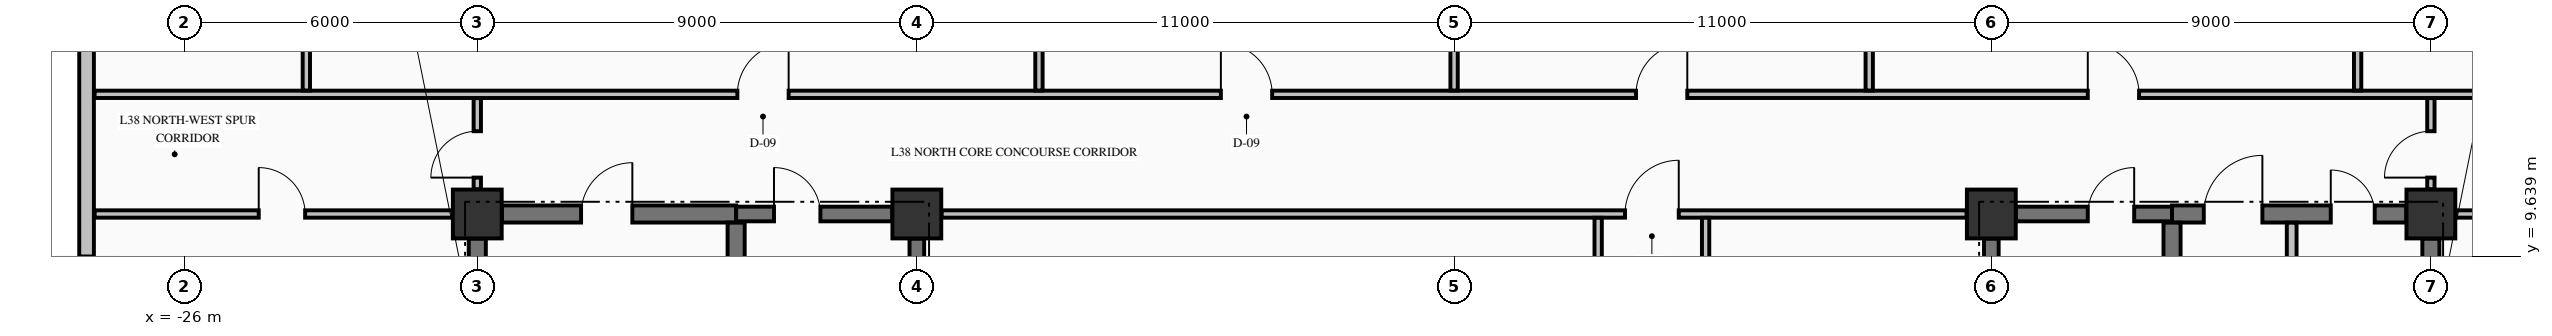
"""IFC4 building model, lengths in metres.
Left out: names, types, materials, properties, quantities, classifications, styles, units other than length and angle.
Written with IfcOpenShell. Run it as: python <this file> out.ifc"""

import sys

from ifc_helpers import new_model, si_unit, direction, frame, frame_2d, origin, origin_2d, place, context, subcontext, project, spatial, rectangle, extrude, element, fill, save


model = new_model("IFC4")
c1 = context("Model", 3, precision=1e-05, world=origin(), true_north=direction((0.0, 1.0)))
c2 = subcontext(c1, "Body", "Model", "MODEL_VIEW")
j1 = project(units=[si_unit("LENGTHUNIT", "METRE"), si_unit("PLANEANGLEUNIT", "RADIAN")], contexts=[c1])
p1 = place(None, origin())
s1 = spatial("IfcSite", under=j1, at=p1, CompositionType="ELEMENT")
p2 = place(p1, origin())
s2 = spatial("IfcBuilding", under=s1, at=p2, CompositionType="ELEMENT")
p3 = place(p2, frame((0.0, 0.0, 149.91)))
s3 = spatial("IfcBuildingStorey", under=s2, at=p3, CompositionType="ELEMENT", Elevation=149.91)
for number, where, z_axis, x_axis in (
    (1, (-20.0, 10.5, -0.25), (0.0, 0.0, 1.0), (1.0, 0.0, 0.0)),
    (2, (-11.0, 10.5, -0.25), (0.0, 0.0, 1.0), (1.0, 0.0, 0.0)),
    (3, (11.0, 10.5, -0.25), (0.0, 0.0, 1.0), (1.0, 0.0, 0.0)),
    (4, (20.0, 10.5, -0.25), (0.0, 0.0, 1.0), (1.0, 0.0, 0.0)),
):
    element("IfcColumn", number, at=place(p3, frame(where, z_axis=z_axis, x_axis=x_axis)), inside=s3, PredefinedType="COLUMN", context=c2, shape_type="SweptSolid", body=[
        extrude(rectangle(XDim=1.0, YDim=1.0, at=origin_2d()), origin(), (0.0, 0.0, 1.0), 3.395),
    ])
p4 = place(p3, frame((-28.0, 20.37, 0.0), z_axis=(0.0, 0.0, 1.0), x_axis=(0.0, -1.0, 0.0)))
e5 = element("IfcWall", 5, at=p4, inside=s3, PredefinedType="STANDARD", context=c2, shape_type="SweptSolid", body=[
    extrude(rectangle(XDim=10.74, YDim=0.3, at=frame_2d((5.37, 0.0))), origin(), (0.0, 0.0, 1.0), 2.537),
])
p5 = place(p3, frame((-19.496, 10.5, 0.0), z_axis=(0.0, 0.0, 1.0), x_axis=(1.0, 0.0, 0.0)))
e6 = element("IfcWall", 6, at=p5, inside=s3, PredefinedType="SHEAR", context=c2, shape_type="SweptSolid", body=[
    extrude(rectangle(XDim=4.796, YDim=0.35, at=frame_2d((2.398, 0.0))), origin(), (0.0, 0.0, 1.0), 3.145),
])
p6 = place(p5, frame((1.621, 0.0, 0.0)))
e7 = element("IfcOpeningElement", 7, at=p6, cuts=e6, PredefinedType="OPENING", context=c2, shape_type="SweptSolid", body=[
    extrude(rectangle(XDim=1.05, YDim=2.15, at=frame_2d((0.525, 1.075))), frame((0.0, 0.185, 0.0), z_axis=(0.0, -1.0, 0.0), x_axis=(1.0, 0.0, 0.0)), (0.0, 0.0, 1.0), 0.37),
])
p7 = place(p3, frame((-14.7, 10.5, 0.0), z_axis=(0.0, 0.0, 1.0), x_axis=(1.0, 0.0, 0.0)))
e8 = element("IfcWall", 8, at=p7, inside=s3, PredefinedType="SHEAR", context=c2, shape_type="SweptSolid", body=[
    extrude(rectangle(XDim=3.196, YDim=0.3, at=frame_2d((1.598, 0.0))), origin(), (0.0, 0.0, 1.0), 3.145),
])
p8 = place(p7, frame((0.775, 0.0, 0.0)))
e9 = element("IfcOpeningElement", 9, at=p8, cuts=e8, PredefinedType="OPENING", context=c2, shape_type="SweptSolid", body=[
    extrude(rectangle(XDim=0.95, YDim=2.15, at=frame_2d((0.475, 1.075))), frame((0.0, 0.16, 0.0), z_axis=(0.0, -1.0, 0.0), x_axis=(1.0, 0.0, 0.0)), (0.0, 0.0, 1.0), 0.32),
])
p9 = place(p3, frame((11.504, 10.5, 0.0), z_axis=(0.0, 0.0, 1.0), x_axis=(1.0, 0.0, 0.0)))
e10 = element("IfcWall", 10, at=p9, inside=s3, PredefinedType="SHEAR", context=c2, shape_type="SweptSolid", body=[
    extrude(rectangle(XDim=3.196, YDim=0.3, at=frame_2d((1.598, 0.0))), origin(), (0.0, 0.0, 1.0), 3.145),
])
p10 = place(p9, frame((1.471, 0.0, 0.0)))
e11 = element("IfcOpeningElement", 11, at=p10, cuts=e10, PredefinedType="OPENING", context=c2, shape_type="SweptSolid", body=[
    extrude(rectangle(XDim=0.95, YDim=2.15, at=frame_2d((0.475, 1.075))), frame((0.0, 0.16, 0.0), z_axis=(0.0, -1.0, 0.0), x_axis=(1.0, 0.0, 0.0)), (0.0, 0.0, 1.0), 0.32),
])
p11 = place(p3, frame((14.7, 10.5, 0.0), z_axis=(0.0, 0.0, 1.0), x_axis=(1.0, 0.0, 0.0)))
e12 = element("IfcWall", 12, at=p11, inside=s3, PredefinedType="SHEAR", context=c2, shape_type="SweptSolid", body=[
    extrude(rectangle(XDim=4.796, YDim=0.35, at=frame_2d((2.398, 0.0))), origin(), (0.0, 0.0, 1.0), 3.145),
])
p12 = place(p11, frame((0.65, 0.0, 0.0)))
e13 = element("IfcOpeningElement", 13, at=p12, cuts=e12, PredefinedType="OPENING", context=c2, shape_type="SweptSolid", body=[
    extrude(rectangle(XDim=1.2, YDim=2.15, at=frame_2d((0.6, 1.075))), frame((0.0, 0.185, 0.0), z_axis=(0.0, -1.0, 0.0), x_axis=(1.0, 0.0, 0.0)), (0.0, 0.0, 1.0), 0.37),
])
p13 = place(p11, frame((3.25, 0.0, 0.0)))
e14 = element("IfcOpeningElement", 14, at=p13, cuts=e12, PredefinedType="OPENING", context=c2, shape_type="SweptSolid", body=[
    extrude(rectangle(XDim=0.9, YDim=2.15, at=frame_2d((0.45, 1.075))), frame((0.0, 0.185, 0.0), z_axis=(0.0, -1.0, 0.0), x_axis=(1.0, 0.0, 0.0)), (0.0, 0.0, 1.0), 0.37),
])
p14 = place(p3, frame((-27.835, 10.5, 0.0), z_axis=(0.0, 0.0, 1.0), x_axis=(1.0, 0.0, 0.0)))
e15 = element("IfcWall", 15, at=p14, inside=s3, PredefinedType="PARTITIONING", context=c2, shape_type="SweptSolid", body=[
    extrude(rectangle(XDim=7.329, YDim=0.15, at=frame_2d((3.665, 0.0))), origin(), (0.0, 0.0, 1.0), 3.145),
])
p15 = place(p14, frame((3.36, 0.0, 0.0)))
e16 = element("IfcOpeningElement", 16, at=p15, cuts=e15, PredefinedType="OPENING", context=c2, shape_type="SweptSolid", body=[
    extrude(rectangle(XDim=0.95, YDim=2.15, at=frame_2d((0.475, 1.075))), frame((0.0, 0.085, 0.0), z_axis=(0.0, -1.0, 0.0), x_axis=(1.0, 0.0, 0.0)), (0.0, 0.0, 1.0), 0.17),
])
p16 = place(p3, frame((-10.494, 10.5, 0.0), z_axis=(0.0, 0.0, 1.0), x_axis=(1.0, 0.0, 0.0)))
e17 = element("IfcWall", 17, at=p16, inside=s3, PredefinedType="PARTITIONING", context=c2, shape_type="SweptSolid", body=[
    extrude(rectangle(XDim=20.988, YDim=0.15, at=frame_2d((10.494, 0.0))), origin(), (0.0, 0.0, 1.0), 3.145),
])
p17 = place(p16, frame((13.994, 0.0, 0.0)))
e18 = element("IfcOpeningElement", 18, at=p17, cuts=e17, PredefinedType="OPENING", context=c2, shape_type="SweptSolid", body=[
    extrude(rectangle(XDim=1.1, YDim=2.15, at=frame_2d((0.55, 1.075))), frame((0.0, 0.085, 0.0), z_axis=(0.0, -1.0, 0.0), x_axis=(1.0, 0.0, 0.0)), (0.0, 0.0, 1.0), 0.17),
])
p18 = place(p3, frame((20.506, 10.5, 0.0), z_axis=(0.0, 0.0, 1.0), x_axis=(1.0, 0.0, 0.0)))
e19 = element("IfcWall", 19, at=p18, inside=s3, PredefinedType="PARTITIONING", context=c2, shape_type="SweptSolid", body=[
    extrude(rectangle(XDim=2.329, YDim=0.15, at=frame_2d((1.165, 0.0))), origin(), (0.0, 0.0, 1.0), 3.145),
])
p19 = place(p18, frame((0.494, 0.0, 0.0)))
e20 = element("IfcOpeningElement", 20, at=p19, cuts=e19, PredefinedType="OPENING", context=c2, shape_type="SweptSolid", body=[
    extrude(rectangle(XDim=1.0, YDim=2.15, at=frame_2d((0.5, 1.075))), frame((0.0, 0.085, 0.0), z_axis=(0.0, -1.0, 0.0), x_axis=(1.0, 0.0, 0.0)), (0.0, 0.0, 1.0), 0.17),
])
p20 = place(p3, frame((-27.835, 12.95, 0.0), z_axis=(0.0, 0.0, 1.0), x_axis=(1.0, 0.0, 0.0)))
e21 = element("IfcWall", 21, at=p20, inside=s3, PredefinedType="PARTITIONING", context=c2, shape_type="SweptSolid", body=[
    extrude(rectangle(XDim=50.67, YDim=0.15, at=frame_2d((25.335, 0.0))), origin(), (0.0, 0.0, 1.0), 3.145),
])
p21 = place(p20, frame((13.16, 0.0, 0.0)))
e22 = element("IfcOpeningElement", 22, at=p21, cuts=e21, PredefinedType="OPENING", context=c2, shape_type="SweptSolid", body=[
    extrude(rectangle(XDim=1.05, YDim=2.15, at=frame_2d((0.525, 1.075))), frame((0.0, 0.085, 0.0), z_axis=(0.0, -1.0, 0.0), x_axis=(1.0, 0.0, 0.0)), (0.0, 0.0, 1.0), 0.17),
])
p22 = place(p20, frame((23.06, 0.0, 0.0)))
e23 = element("IfcOpeningElement", 23, at=p22, cuts=e21, PredefinedType="OPENING", context=c2, shape_type="SweptSolid", body=[
    extrude(rectangle(XDim=1.05, YDim=2.15, at=frame_2d((0.525, 1.075))), frame((0.0, 0.085, 0.0), z_axis=(0.0, -1.0, 0.0), x_axis=(1.0, 0.0, 0.0)), (0.0, 0.0, 1.0), 0.17),
])
p23 = place(p20, frame((31.56, 0.0, 0.0)))
e24 = element("IfcOpeningElement", 24, at=p23, cuts=e21, PredefinedType="OPENING", context=c2, shape_type="SweptSolid", body=[
    extrude(rectangle(XDim=1.05, YDim=2.15, at=frame_2d((0.525, 1.075))), frame((0.0, 0.085, 0.0), z_axis=(0.0, -1.0, 0.0), x_axis=(1.0, 0.0, 0.0)), (0.0, 0.0, 1.0), 0.17),
])
p24 = place(p20, frame((40.81, 0.0, 0.0)))
e25 = element("IfcOpeningElement", 25, at=p24, cuts=e21, PredefinedType="OPENING", context=c2, shape_type="SweptSolid", body=[
    extrude(rectangle(XDim=1.05, YDim=2.15, at=frame_2d((0.525, 1.075))), frame((0.0, 0.085, 0.0), z_axis=(0.0, -1.0, 0.0), x_axis=(1.0, 0.0, 0.0)), (0.0, 0.0, 1.0), 0.17),
])
p25 = place(p3, frame((-20.0, 0.504, 0.0), z_axis=(0.0, 0.0, 1.0), x_axis=(0.0, 1.0, 0.0)))
e26 = element("IfcWall", 26, at=p25, inside=s3, PredefinedType="SHEAR", context=c2, shape_type="SweptSolid", body=[
    extrude(rectangle(XDim=9.492, YDim=0.35, at=frame_2d((4.746, 0.0))), origin(), (0.0, 0.0, 1.0), 3.145),
])
p26 = place(p3, frame((-14.7, 5.852, 0.0), z_axis=(0.0, 0.0, 1.0), x_axis=(0.0, 1.0, 0.0)))
e27 = element("IfcWall", 27, at=p26, inside=s3, PredefinedType="SHEAR", context=c2, shape_type="SweptSolid", body=[
    extrude(rectangle(XDim=4.471, YDim=0.35, at=frame_2d((2.235, 0.0))), origin(), (0.0, 0.0, 1.0), 3.145),
])
for number, where, z_axis, x_axis in (
    (28, (-11.0, 5.852, 0.0), (0.0, 0.0, 1.0), (0.0, 1.0, 0.0)),
    (29, (11.0, 5.852, 0.0), (0.0, 0.0, 1.0), (0.0, 1.0, 0.0)),
):
    element("IfcWall", number, at=place(p3, frame(where, z_axis=z_axis, x_axis=x_axis)), inside=s3, PredefinedType="SHEAR", context=c2, shape_type="SweptSolid", body=[
        extrude(rectangle(XDim=4.144, YDim=0.3, at=frame_2d((2.072, 0.0))), origin(), (0.0, 0.0, 1.0), 3.145),
    ])
p27 = place(p3, frame((14.7, 5.852, 0.0), z_axis=(0.0, 0.0, 1.0), x_axis=(0.0, 1.0, 0.0)))
e30 = element("IfcWall", 30, at=p27, inside=s3, PredefinedType="SHEAR", context=c2, shape_type="SweptSolid", body=[
    extrude(rectangle(XDim=4.471, YDim=0.35, at=frame_2d((2.235, 0.0))), origin(), (0.0, 0.0, 1.0), 3.145),
])
p28 = place(p3, frame((20.0, 5.377, 0.0), z_axis=(0.0, 0.0, 1.0), x_axis=(0.0, 1.0, 0.0)))
e31 = element("IfcWall", 31, at=p28, inside=s3, PredefinedType="SHEAR", context=c2, shape_type="SweptSolid", body=[
    extrude(rectangle(XDim=4.619, YDim=0.35, at=frame_2d((2.31, 0.0))), origin(), (0.0, 0.0, 1.0), 3.145),
])
p29 = place(p3, frame((-23.5, 13.028, 0.0), z_axis=(0.0, 0.0, 1.0), x_axis=(0.0, 1.0, 0.0)))
e32 = element("IfcWall", 32, at=p29, inside=s3, PredefinedType="PARTITIONING", context=c2, shape_type="SweptSolid", body=[
    extrude(rectangle(XDim=7.366, YDim=0.15, at=frame_2d((3.683, 0.0))), origin(), (0.0, 0.0, 1.0), 3.145),
])
p30 = place(p3, frame((-20.0, 11.006, 0.0), z_axis=(0.0, 0.0, 1.0), x_axis=(0.0, 1.0, 0.0)))
e33 = element("IfcWall", 33, at=p30, inside=s3, PredefinedType="PARTITIONING", context=c2, shape_type="SweptSolid", body=[
    extrude(rectangle(XDim=1.866, YDim=0.15, at=frame_2d((0.933, 0.0))), origin(), (0.0, 0.0, 1.0), 2.635),
])
p31 = place(p30, frame((0.239, 0.0, 0.0)))
e34 = element("IfcOpeningElement", 34, at=p31, cuts=e33, PredefinedType="OPENING", context=c2, shape_type="SweptSolid", body=[
    extrude(rectangle(XDim=0.95, YDim=2.15, at=frame_2d((0.475, 1.075))), frame((0.0, 0.085, 0.0), z_axis=(0.0, -1.0, 0.0), x_axis=(1.0, 0.0, 0.0)), (0.0, 0.0, 1.0), 0.17),
])
p32 = place(p3, frame((-8.5, 13.028, 0.0), z_axis=(0.0, 0.0, 1.0), x_axis=(0.0, 1.0, 0.0)))
e35 = element("IfcWall", 35, at=p32, inside=s3, PredefinedType="PARTITIONING", context=c2, shape_type="SweptSolid", body=[
    extrude(rectangle(XDim=12.307, YDim=0.15, at=frame_2d((6.153, 0.0))), origin(), (0.0, 0.0, 1.0), 3.145),
])
p33 = place(p3, frame((0.0, 13.028, 0.0), z_axis=(0.0, 0.0, 1.0), x_axis=(0.0, 1.0, 0.0)))
e36 = element("IfcWall", 36, at=p33, inside=s3, PredefinedType="PARTITIONING", context=c2, shape_type="SweptSolid", body=[
    extrude(rectangle(XDim=11.866, YDim=0.15, at=frame_2d((5.933, 0.0))), origin(), (0.0, 0.0, 1.0), 2.635),
])
for number, where, z_axis, x_axis in (
    (37, (2.95, 2.978, 0.0), (0.0, 0.0, 1.0), (0.0, 1.0, 0.0)),
    (38, (5.15, 2.978, 0.0), (0.0, 0.0, 1.0), (0.0, 1.0, 0.0)),
):
    element("IfcWall", number, at=place(p3, frame(where, z_axis=z_axis, x_axis=x_axis)), inside=s3, PredefinedType="PARTITIONING", context=c2, shape_type="SweptSolid", body=[
        extrude(rectangle(XDim=7.444, YDim=0.15, at=frame_2d((3.722, 0.0))), origin(), (0.0, 0.0, 1.0), 3.145),
    ])
p34 = place(p3, frame((8.5, 13.028, 0.0), z_axis=(0.0, 0.0, 1.0), x_axis=(0.0, 1.0, 0.0)))
e39 = element("IfcWall", 39, at=p34, inside=s3, PredefinedType="PARTITIONING", context=c2, shape_type="SweptSolid", body=[
    extrude(rectangle(XDim=12.412, YDim=0.15, at=frame_2d((6.206, 0.0))), origin(), (0.0, 0.0, 1.0), 3.145),
])
p35 = place(p3, frame((17.15, 5.378, 0.0), z_axis=(0.0, 0.0, 1.0), x_axis=(0.0, 1.0, 0.0)))
e40 = element("IfcWall", 40, at=p35, inside=s3, PredefinedType="PARTITIONING", context=c2, shape_type="SweptSolid", body=[
    extrude(rectangle(XDim=4.944, YDim=0.2, at=frame_2d((2.472, 0.0))), origin(), (0.0, 0.0, 1.0), 3.145),
])
p36 = place(p3, frame((18.5, 13.028, 0.0), z_axis=(0.0, 0.0, 1.0), x_axis=(0.0, 1.0, 0.0)))
e41 = element("IfcWall", 41, at=p36, inside=s3, PredefinedType="PARTITIONING", context=c2, shape_type="SweptSolid", body=[
    extrude(rectangle(XDim=7.366, YDim=0.15, at=frame_2d((3.683, 0.0))), origin(), (0.0, 0.0, 1.0), 3.145),
])
p37 = place(p3, frame((20.0, 11.006, 0.0), z_axis=(0.0, 0.0, 1.0), x_axis=(0.0, 1.0, 0.0)))
e42 = element("IfcWall", 42, at=p37, inside=s3, PredefinedType="PARTITIONING", context=c2, shape_type="SweptSolid", body=[
    extrude(rectangle(XDim=1.866, YDim=0.15, at=frame_2d((0.933, 0.0))), origin(), (0.0, 0.0, 1.0), 2.635),
])
p38 = place(p37, frame((0.239, 0.0, 0.0)))
e43 = element("IfcOpeningElement", 43, at=p38, cuts=e42, PredefinedType="OPENING", context=c2, shape_type="SweptSolid", body=[
    extrude(rectangle(XDim=0.95, YDim=2.15, at=frame_2d((0.475, 1.075))), frame((0.0, 0.085, 0.0), z_axis=(0.0, -1.0, 0.0), x_axis=(1.0, 0.0, 0.0)), (0.0, 0.0, 1.0), 0.17),
])
p39 = place(p8, origin())
e44 = element("IfcDoor", 44, at=p39, inside=s3, OperationType="SINGLE_SWING_LEFT", PredefinedType="DOOR", context=c2, shape_type="SweptSolid", body=[
    extrude(rectangle(XDim=0.95, YDim=2.15, at=frame_2d((0.475, 1.075))), frame((0.0, 0.025, 0.0), z_axis=(0.0, -1.0, 0.0), x_axis=(1.0, 0.0, 0.0)), (0.0, 0.0, 1.0), 0.05),
])
fill(e9, e44)
p40 = place(p10, origin())
e45 = element("IfcDoor", 45, at=p40, inside=s3, OperationType="SINGLE_SWING_RIGHT", PredefinedType="DOOR", context=c2, shape_type="SweptSolid", body=[
    extrude(rectangle(XDim=0.95, YDim=2.15, at=frame_2d((0.475, 1.075))), frame((0.0, 0.025, 0.0), z_axis=(0.0, -1.0, 0.0), x_axis=(1.0, 0.0, 0.0)), (0.0, 0.0, 1.0), 0.05),
])
fill(e11, e45)
p41 = place(p6, origin())
e46 = element("IfcDoor", 46, at=p41, inside=s3, OperationType="SINGLE_SWING_RIGHT", PredefinedType="DOOR", context=c2, shape_type="SweptSolid", body=[
    extrude(rectangle(XDim=1.05, YDim=2.15, at=frame_2d((0.525, 1.075))), frame((0.0, 0.025, 0.0), z_axis=(0.0, -1.0, 0.0), x_axis=(1.0, 0.0, 0.0)), (0.0, 0.0, 1.0), 0.05),
])
fill(e7, e46)
p42 = place(p12, origin())
e47 = element("IfcDoor", 47, at=p42, inside=s3, OperationType="SINGLE_SWING_RIGHT", PredefinedType="DOOR", context=c2, shape_type="SweptSolid", body=[
    extrude(rectangle(XDim=1.2, YDim=2.15, at=frame_2d((0.6, 1.075))), frame((0.0, 0.025, 0.0), z_axis=(0.0, -1.0, 0.0), x_axis=(1.0, 0.0, 0.0)), (0.0, 0.0, 1.0), 0.05),
])
fill(e13, e47)
p43 = place(p13, origin())
e48 = element("IfcDoor", 48, at=p43, inside=s3, OperationType="SINGLE_SWING_LEFT", PredefinedType="DOOR", context=c2, shape_type="SweptSolid", body=[
    extrude(rectangle(XDim=0.9, YDim=2.15, at=frame_2d((0.45, 1.075))), frame((0.0, 0.025, 0.0), z_axis=(0.0, -1.0, 0.0), x_axis=(1.0, 0.0, 0.0)), (0.0, 0.0, 1.0), 0.05),
])
fill(e14, e48)
p44 = place(p17, origin())
e49 = element("IfcDoor", 49, at=p44, inside=s3, OperationType="SINGLE_SWING_RIGHT", PredefinedType="DOOR", context=c2, shape_type="SweptSolid", body=[
    extrude(rectangle(XDim=1.1, YDim=2.15, at=frame_2d((0.55, 1.075))), frame((0.0, 0.025, 0.0), z_axis=(0.0, -1.0, 0.0), x_axis=(1.0, 0.0, 0.0)), (0.0, 0.0, 1.0), 0.05),
])
fill(e18, e49)
p45 = place(p21, origin())
e50 = element("IfcDoor", 50, at=p45, inside=s3, OperationType="SINGLE_SWING_RIGHT", PredefinedType="DOOR", context=c2, shape_type="SweptSolid", body=[
    extrude(rectangle(XDim=1.05, YDim=2.15, at=frame_2d((0.525, 1.075))), frame((0.0, 0.025, 0.0), z_axis=(0.0, -1.0, 0.0), x_axis=(1.0, 0.0, 0.0)), (0.0, 0.0, 1.0), 0.05),
])
fill(e22, e50)
p46 = place(p22, origin())
e51 = element("IfcDoor", 51, at=p46, inside=s3, OperationType="SINGLE_SWING_LEFT", PredefinedType="DOOR", context=c2, shape_type="SweptSolid", body=[
    extrude(rectangle(XDim=1.05, YDim=2.15, at=frame_2d((0.525, 1.075))), frame((0.0, 0.025, 0.0), z_axis=(0.0, -1.0, 0.0), x_axis=(1.0, 0.0, 0.0)), (0.0, 0.0, 1.0), 0.05),
])
fill(e23, e51)
p47 = place(p23, origin())
e52 = element("IfcDoor", 52, at=p47, inside=s3, OperationType="SINGLE_SWING_RIGHT", PredefinedType="DOOR", context=c2, shape_type="SweptSolid", body=[
    extrude(rectangle(XDim=1.05, YDim=2.15, at=frame_2d((0.525, 1.075))), frame((0.0, 0.025, 0.0), z_axis=(0.0, -1.0, 0.0), x_axis=(1.0, 0.0, 0.0)), (0.0, 0.0, 1.0), 0.05),
])
fill(e24, e52)
p48 = place(p24, origin())
e53 = element("IfcDoor", 53, at=p48, inside=s3, OperationType="SINGLE_SWING_LEFT", PredefinedType="DOOR", context=c2, shape_type="SweptSolid", body=[
    extrude(rectangle(XDim=1.05, YDim=2.15, at=frame_2d((0.525, 1.075))), frame((0.0, 0.025, 0.0), z_axis=(0.0, -1.0, 0.0), x_axis=(1.0, 0.0, 0.0)), (0.0, 0.0, 1.0), 0.05),
])
fill(e25, e53)
p49 = place(p31, origin())
e54 = element("IfcDoor", 54, at=p49, inside=s3, OperationType="SINGLE_SWING_LEFT", PredefinedType="DOOR", context=c2, shape_type="SweptSolid", body=[
    extrude(rectangle(XDim=0.95, YDim=2.15, at=frame_2d((0.475, 1.075))), frame((0.0, 0.025, 0.0), z_axis=(0.0, -1.0, 0.0), x_axis=(1.0, 0.0, 0.0)), (0.0, 0.0, 1.0), 0.05),
])
fill(e34, e54)
p50 = place(p15, origin())
e55 = element("IfcDoor", 55, at=p50, inside=s3, OperationType="SINGLE_SWING_LEFT", PredefinedType="DOOR", context=c2, shape_type="SweptSolid", body=[
    extrude(rectangle(XDim=0.95, YDim=2.15, at=frame_2d((0.475, 1.075))), frame((0.0, 0.025, 0.0), z_axis=(0.0, -1.0, 0.0), x_axis=(1.0, 0.0, 0.0)), (0.0, 0.0, 1.0), 0.05),
])
fill(e16, e55)
p51 = place(p38, origin())
e56 = element("IfcDoor", 56, at=p51, inside=s3, OperationType="SINGLE_SWING_LEFT", PredefinedType="DOOR", context=c2, shape_type="SweptSolid", body=[
    extrude(rectangle(XDim=0.95, YDim=2.15, at=frame_2d((0.475, 1.075))), frame((0.0, 0.025, 0.0), z_axis=(0.0, -1.0, 0.0), x_axis=(1.0, 0.0, 0.0)), (0.0, 0.0, 1.0), 0.05),
])
fill(e43, e56)
save(model, sys.argv[1])
